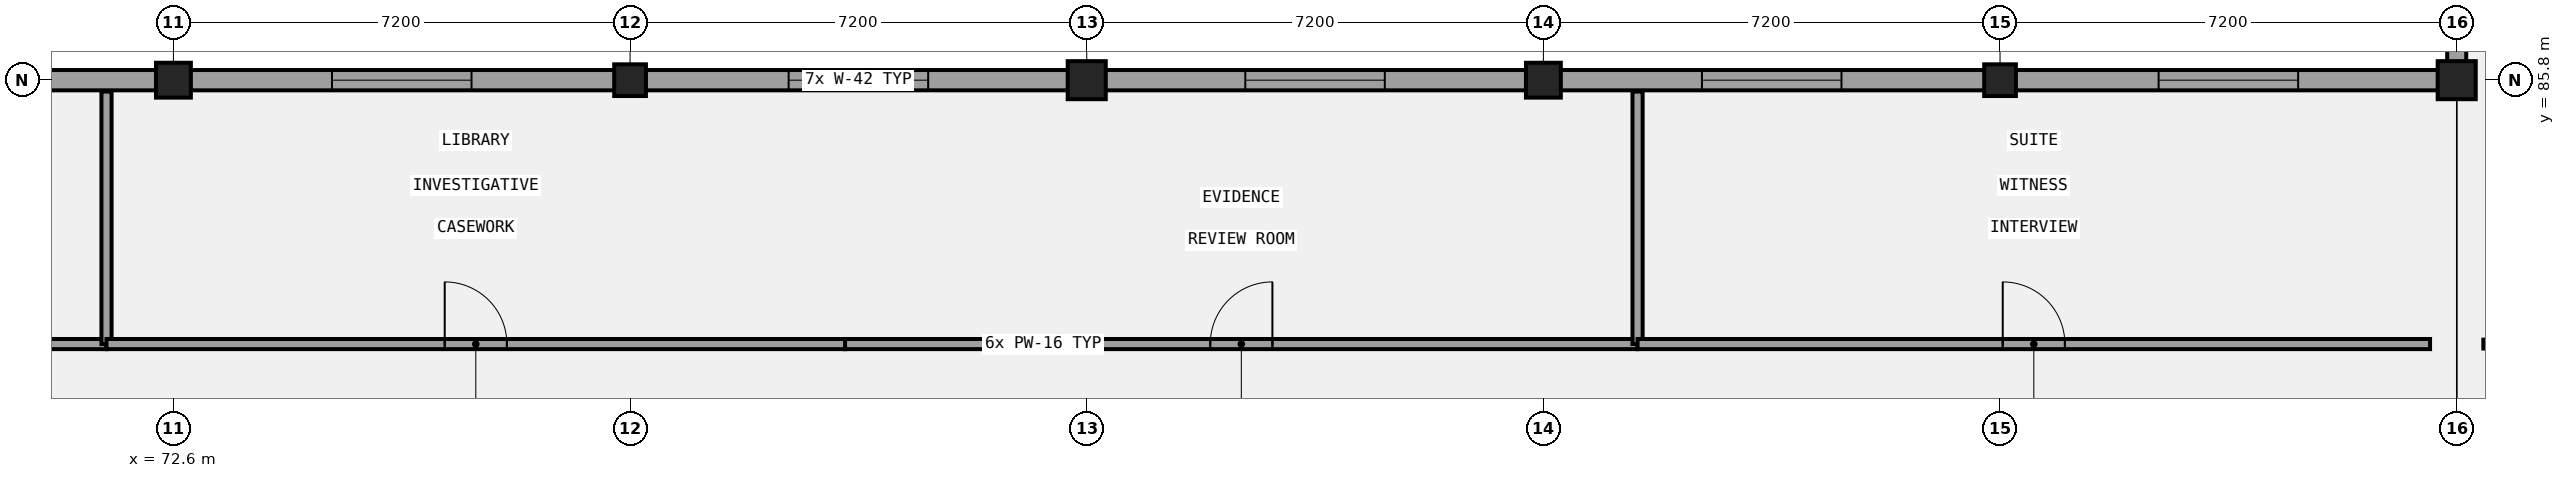
"""IFC4 building model, lengths in metres.
Left out: names, types, materials, properties, quantities, classifications, styles, units other than length and angle.
Written with IfcOpenShell. Run it as: python <this file> out.ifc"""

import sys

from ifc_helpers import new_model, si_unit, direction, frame, frame_2d, origin, origin_2d, place, context, subcontext, project, spatial, rectangle, extrude, element, fill, save


model = new_model("IFC4")
c1 = context("Model", 3, precision=1e-05, world=origin(), true_north=direction((0.0, 1.0)))
c2 = subcontext(c1, "Body", "Model", "MODEL_VIEW")
j1 = project(units=[si_unit("LENGTHUNIT", "METRE"), si_unit("PLANEANGLEUNIT", "RADIAN")], contexts=[c1])
p1 = place(None, origin())
s1 = spatial("IfcSite", under=j1, at=p1, CompositionType="ELEMENT")
p2 = place(p1, origin())
s2 = spatial("IfcBuilding", under=s1, at=p2, CompositionType="ELEMENT")
p3 = place(p2, frame((0.0, 0.0, 18.0)))
s3 = spatial("IfcBuildingStorey", under=s2, at=p3, CompositionType="ELEMENT", Elevation=18.0)
p4 = place(p3, frame((72.6, 85.8, 0.0), z_axis=(0.0, 0.0, 1.0), x_axis=(1.0, 0.0, 0.0)))
e1 = element("IfcColumn", 1, at=p4, inside=s3, PredefinedType="COLUMN", context=c2, shape_type="SweptSolid", body=[
    extrude(rectangle(XDim=0.55, YDim=0.55, at=origin_2d()), origin(), (0.0, 0.0, 1.0), 4.2),
])
p5 = place(p3, frame((79.8, 85.8, 0.0), z_axis=(0.0, 0.0, 1.0), x_axis=(1.0, 0.0, 0.0)))
e2 = element("IfcColumn", 2, at=p5, inside=s3, PredefinedType="COLUMN", context=c2, shape_type="SweptSolid", body=[
    extrude(rectangle(XDim=0.5, YDim=0.5, at=origin_2d()), origin(), (0.0, 0.0, 1.0), 4.2),
])
p6 = place(p3, frame((87.0, 85.8, 0.0), z_axis=(0.0, 0.0, 1.0), x_axis=(1.0, 0.0, 0.0)))
e3 = element("IfcColumn", 3, at=p6, inside=s3, PredefinedType="COLUMN", context=c2, shape_type="SweptSolid", body=[
    extrude(rectangle(XDim=0.6, YDim=0.6, at=origin_2d()), origin(), (0.0, 0.0, 1.0), 4.2),
])
p7 = place(p3, frame((94.2, 85.8, 0.0), z_axis=(0.0, 0.0, 1.0), x_axis=(1.0, 0.0, 0.0)))
e4 = element("IfcColumn", 4, at=p7, inside=s3, PredefinedType="COLUMN", context=c2, shape_type="SweptSolid", body=[
    extrude(rectangle(XDim=0.55, YDim=0.55, at=origin_2d()), origin(), (0.0, 0.0, 1.0), 4.2),
])
p8 = place(p3, frame((101.4, 85.8, 0.0), z_axis=(0.0, 0.0, 1.0), x_axis=(1.0, 0.0, 0.0)))
e5 = element("IfcColumn", 5, at=p8, inside=s3, PredefinedType="COLUMN", context=c2, shape_type="SweptSolid", body=[
    extrude(rectangle(XDim=0.5, YDim=0.5, at=origin_2d()), origin(), (0.0, 0.0, 1.0), 4.2),
])
p9 = place(p3, frame((108.6, 85.8, 0.0), z_axis=(0.0, 0.0, 1.0), x_axis=(1.0, 0.0, 0.0)))
e6 = element("IfcColumn", 6, at=p9, inside=s3, PredefinedType="COLUMN", context=c2, shape_type="SweptSolid", body=[
    extrude(rectangle(XDim=0.6, YDim=0.6, at=origin_2d()), origin(), (0.0, 0.0, 1.0), 4.2),
])
p10 = place(p3, frame((108.6, 92.81, 0.0), z_axis=(0.0, 0.0, 1.0), x_axis=(0.0, -1.0, 0.0)))
e7 = element("IfcWall", 7, at=p10, inside=s3, PredefinedType="SOLIDWALL", context=c2, shape_type="SweptSolid", body=[
    extrude(rectangle(XDim=6.86, YDim=0.3, at=frame_2d((3.43, 0.0))), origin(), (0.0, 0.0, 1.0), 3.39),
])
p11 = place(p10, frame((2.63, 0.0, 0.95)))
e8 = element("IfcOpeningElement", 8, at=p11, cuts=e7, PredefinedType="OPENING", context=c2, shape_type="SweptSolid", body=[
    extrude(rectangle(XDim=1.6, YDim=1.4, at=frame_2d((0.8, 0.7))), frame((0.0, 0.16, 0.0), z_axis=(0.0, -1.0, 0.0), x_axis=(1.0, 0.0, 0.0)), (0.0, 0.0, 1.0), 0.32),
])
p12 = place(p3, frame((108.76, 85.8, 0.0), z_axis=(0.0, 0.0, 1.0), x_axis=(-1.0, 0.0, 0.0)))
e9 = element("IfcWall", 9, at=p12, inside=s3, PredefinedType="SOLIDWALL", context=c2, shape_type="SweptSolid", body=[
    extrude(rectangle(XDim=101.12, YDim=0.32, at=frame_2d((50.56, 0.0))), origin(), (0.0, 0.0, 1.0), 2.94),
])
p13 = place(p12, frame((96.26, 0.0, 1.0)))
e10 = element("IfcOpeningElement", 10, at=p13, cuts=e9, PredefinedType="OPENING", context=c2, shape_type="SweptSolid", body=[
    extrude(rectangle(XDim=2.2, YDim=1.65, at=frame_2d((1.1, 0.825))), frame((0.0, 0.17, 0.0), z_axis=(0.0, -1.0, 0.0), x_axis=(1.0, 0.0, 0.0)), (0.0, 0.0, 1.0), 0.34),
])
p14 = place(p12, frame((89.06, 0.0, 1.0)))
e11 = element("IfcOpeningElement", 11, at=p14, cuts=e9, PredefinedType="OPENING", context=c2, shape_type="SweptSolid", body=[
    extrude(rectangle(XDim=2.2, YDim=1.65, at=frame_2d((1.1, 0.825))), frame((0.0, 0.17, 0.0), z_axis=(0.0, -1.0, 0.0), x_axis=(1.0, 0.0, 0.0)), (0.0, 0.0, 1.0), 0.34),
])
p15 = place(p12, frame((81.86, 0.0, 1.0)))
e12 = element("IfcOpeningElement", 12, at=p15, cuts=e9, PredefinedType="OPENING", context=c2, shape_type="SweptSolid", body=[
    extrude(rectangle(XDim=2.2, YDim=1.65, at=frame_2d((1.1, 0.825))), frame((0.0, 0.17, 0.0), z_axis=(0.0, -1.0, 0.0), x_axis=(1.0, 0.0, 0.0)), (0.0, 0.0, 1.0), 0.34),
])
p16 = place(p12, frame((74.66, 0.0, 1.0)))
e13 = element("IfcOpeningElement", 13, at=p16, cuts=e9, PredefinedType="OPENING", context=c2, shape_type="SweptSolid", body=[
    extrude(rectangle(XDim=2.2, YDim=1.65, at=frame_2d((1.1, 0.825))), frame((0.0, 0.17, 0.0), z_axis=(0.0, -1.0, 0.0), x_axis=(1.0, 0.0, 0.0)), (0.0, 0.0, 1.0), 0.34),
])
p17 = place(p12, frame((67.46, 0.0, 1.0)))
e14 = element("IfcOpeningElement", 14, at=p17, cuts=e9, PredefinedType="OPENING", context=c2, shape_type="SweptSolid", body=[
    extrude(rectangle(XDim=2.2, YDim=1.65, at=frame_2d((1.1, 0.825))), frame((0.0, 0.17, 0.0), z_axis=(0.0, -1.0, 0.0), x_axis=(1.0, 0.0, 0.0)), (0.0, 0.0, 1.0), 0.34),
])
p18 = place(p12, frame((60.26, 0.0, 1.0)))
e15 = element("IfcOpeningElement", 15, at=p18, cuts=e9, PredefinedType="OPENING", context=c2, shape_type="SweptSolid", body=[
    extrude(rectangle(XDim=2.2, YDim=1.65, at=frame_2d((1.1, 0.825))), frame((0.0, 0.17, 0.0), z_axis=(0.0, -1.0, 0.0), x_axis=(1.0, 0.0, 0.0)), (0.0, 0.0, 1.0), 0.34),
])
p19 = place(p12, frame((53.06, 0.0, 1.0)))
e16 = element("IfcOpeningElement", 16, at=p19, cuts=e9, PredefinedType="OPENING", context=c2, shape_type="SweptSolid", body=[
    extrude(rectangle(XDim=2.2, YDim=1.65, at=frame_2d((1.1, 0.825))), frame((0.0, 0.17, 0.0), z_axis=(0.0, -1.0, 0.0), x_axis=(1.0, 0.0, 0.0)), (0.0, 0.0, 1.0), 0.34),
])
p20 = place(p12, frame((45.86, 0.0, 1.0)))
e17 = element("IfcOpeningElement", 17, at=p20, cuts=e9, PredefinedType="OPENING", context=c2, shape_type="SweptSolid", body=[
    extrude(rectangle(XDim=2.2, YDim=1.65, at=frame_2d((1.1, 0.825))), frame((0.0, 0.17, 0.0), z_axis=(0.0, -1.0, 0.0), x_axis=(1.0, 0.0, 0.0)), (0.0, 0.0, 1.0), 0.34),
])
p21 = place(p12, frame((38.66, 0.0, 1.0)))
e18 = element("IfcOpeningElement", 18, at=p21, cuts=e9, PredefinedType="OPENING", context=c2, shape_type="SweptSolid", body=[
    extrude(rectangle(XDim=2.2, YDim=1.65, at=frame_2d((1.1, 0.825))), frame((0.0, 0.17, 0.0), z_axis=(0.0, -1.0, 0.0), x_axis=(1.0, 0.0, 0.0)), (0.0, 0.0, 1.0), 0.34),
])
p22 = place(p12, frame((31.46, 0.0, 1.0)))
e19 = element("IfcOpeningElement", 19, at=p22, cuts=e9, PredefinedType="OPENING", context=c2, shape_type="SweptSolid", body=[
    extrude(rectangle(XDim=2.2, YDim=1.65, at=frame_2d((1.1, 0.825))), frame((0.0, 0.17, 0.0), z_axis=(0.0, -1.0, 0.0), x_axis=(1.0, 0.0, 0.0)), (0.0, 0.0, 1.0), 0.34),
])
p23 = place(p12, frame((24.26, 0.0, 1.0)))
e20 = element("IfcOpeningElement", 20, at=p23, cuts=e9, PredefinedType="OPENING", context=c2, shape_type="SweptSolid", body=[
    extrude(rectangle(XDim=2.2, YDim=1.65, at=frame_2d((1.1, 0.825))), frame((0.0, 0.17, 0.0), z_axis=(0.0, -1.0, 0.0), x_axis=(1.0, 0.0, 0.0)), (0.0, 0.0, 1.0), 0.34),
])
p24 = place(p12, frame((17.06, 0.0, 1.0)))
e21 = element("IfcOpeningElement", 21, at=p24, cuts=e9, PredefinedType="OPENING", context=c2, shape_type="SweptSolid", body=[
    extrude(rectangle(XDim=2.2, YDim=1.65, at=frame_2d((1.1, 0.825))), frame((0.0, 0.17, 0.0), z_axis=(0.0, -1.0, 0.0), x_axis=(1.0, 0.0, 0.0)), (0.0, 0.0, 1.0), 0.34),
])
p25 = place(p12, frame((9.86, 0.0, 1.0)))
e22 = element("IfcOpeningElement", 22, at=p25, cuts=e9, PredefinedType="OPENING", context=c2, shape_type="SweptSolid", body=[
    extrude(rectangle(XDim=2.2, YDim=1.65, at=frame_2d((1.1, 0.825))), frame((0.0, 0.17, 0.0), z_axis=(0.0, -1.0, 0.0), x_axis=(1.0, 0.0, 0.0)), (0.0, 0.0, 1.0), 0.34),
])
p26 = place(p12, frame((2.66, 0.0, 1.0)))
e23 = element("IfcOpeningElement", 23, at=p26, cuts=e9, PredefinedType="OPENING", context=c2, shape_type="SweptSolid", body=[
    extrude(rectangle(XDim=2.2, YDim=1.65, at=frame_2d((1.1, 0.825))), frame((0.0, 0.17, 0.0), z_axis=(0.0, -1.0, 0.0), x_axis=(1.0, 0.0, 0.0)), (0.0, 0.0, 1.0), 0.34),
])
p27 = place(p3, frame((109.02, 81.64, 0.0), z_axis=(0.0, 0.0, 1.0), x_axis=(1.0, 0.0, 0.0)))
e24 = element("IfcWall", 24, at=p27, inside=s3, PredefinedType="PARTITIONING", context=c2, shape_type="SweptSolid", body=[
    extrude(rectangle(XDim=8.79, YDim=0.14, at=frame_2d((4.395, 0.0))), origin(), (0.0, 0.0, 1.0), 3.94),
])
p28 = place(p27, frame((3.875, 0.0, 0.0)))
e25 = element("IfcOpeningElement", 25, at=p28, cuts=e24, PredefinedType="OPENING", context=c2, shape_type="SweptSolid", body=[
    extrude(rectangle(XDim=1.04, YDim=2.22, at=frame_2d((0.52, 1.11))), frame((0.0, 0.08, 0.0), z_axis=(0.0, -1.0, 0.0), x_axis=(1.0, 0.0, 0.0)), (0.0, 0.0, 1.0), 0.16),
])
p29 = place(p3, frame((58.2, 81.64, 0.0), z_axis=(0.0, 0.0, 1.0), x_axis=(1.0, 0.0, 0.0)))
e26 = element("IfcWall", 26, at=p29, inside=s3, PredefinedType="PARTITIONING", context=c2, shape_type="SweptSolid", body=[
    extrude(rectangle(XDim=13.345, YDim=0.16, at=frame_2d((6.672, 0.0))), origin(), (0.0, 0.0, 1.0), 3.94),
])
p30 = place(p29, frame((6.212, 0.0, 0.0)))
e27 = element("IfcOpeningElement", 27, at=p30, cuts=e26, PredefinedType="OPENING", context=c2, shape_type="SweptSolid", body=[
    extrude(rectangle(XDim=0.92, YDim=2.35, at=frame_2d((0.46, 1.175))), frame((0.0, 0.09, 0.0), z_axis=(0.0, -1.0, 0.0), x_axis=(1.0, 0.0, 0.0)), (0.0, 0.0, 1.0), 0.18),
])
p31 = place(p3, frame((71.545, 81.64, 0.0), z_axis=(0.0, 0.0, 1.0), x_axis=(0.0, 1.0, 0.0)))
e28 = element("IfcWall", 28, at=p31, inside=s3, PredefinedType="PARTITIONING", context=c2, shape_type="SweptSolid", body=[
    extrude(rectangle(XDim=3.98, YDim=0.16, at=frame_2d((1.99, 0.0))), origin(), (0.0, 0.0, 1.0), 3.94),
])
p32 = place(p3, frame((71.545, 81.64, 0.0), z_axis=(0.0, 0.0, 1.0), x_axis=(1.0, 0.0, 0.0)))
e29 = element("IfcWall", 29, at=p32, inside=s3, PredefinedType="PARTITIONING", context=c2, shape_type="SweptSolid", body=[
    extrude(rectangle(XDim=11.645, YDim=0.16, at=frame_2d((5.823, 0.0))), origin(), (0.0, 0.0, 1.0), 3.94),
])
p33 = place(p32, frame((5.333, 0.0, 0.0)))
e30 = element("IfcOpeningElement", 30, at=p33, cuts=e29, PredefinedType="OPENING", context=c2, shape_type="SweptSolid", body=[
    extrude(rectangle(XDim=0.98, YDim=2.1, at=frame_2d((0.49, 1.05))), frame((0.0, 0.09, 0.0), z_axis=(0.0, -1.0, 0.0), x_axis=(1.0, 0.0, 0.0)), (0.0, 0.0, 1.0), 0.18),
])
p34 = place(p3, frame((83.19, 81.64, 0.0), z_axis=(0.0, 0.0, 1.0), x_axis=(1.0, 0.0, 0.0)))
e31 = element("IfcWall", 31, at=p34, inside=s3, PredefinedType="PARTITIONING", context=c2, shape_type="SweptSolid", body=[
    extrude(rectangle(XDim=12.495, YDim=0.16, at=frame_2d((6.248, 0.0))), origin(), (0.0, 0.0, 1.0), 3.94),
])
p35 = place(p34, frame((5.758, 0.0, 0.0)))
e32 = element("IfcOpeningElement", 32, at=p35, cuts=e31, PredefinedType="OPENING", context=c2, shape_type="SweptSolid", body=[
    extrude(rectangle(XDim=0.98, YDim=2.22, at=frame_2d((0.49, 1.11))), frame((0.0, 0.09, 0.0), z_axis=(0.0, -1.0, 0.0), x_axis=(1.0, 0.0, 0.0)), (0.0, 0.0, 1.0), 0.18),
])
p36 = place(p3, frame((95.685, 81.64, 0.0), z_axis=(0.0, 0.0, 1.0), x_axis=(0.0, 1.0, 0.0)))
e33 = element("IfcWall", 33, at=p36, inside=s3, PredefinedType="PARTITIONING", context=c2, shape_type="SweptSolid", body=[
    extrude(rectangle(XDim=3.98, YDim=0.16, at=frame_2d((1.99, 0.0))), origin(), (0.0, 0.0, 1.0), 3.94),
])
p37 = place(p3, frame((95.685, 81.64, 0.0), z_axis=(0.0, 0.0, 1.0), x_axis=(1.0, 0.0, 0.0)))
e34 = element("IfcWall", 34, at=p37, inside=s3, PredefinedType="PARTITIONING", context=c2, shape_type="SweptSolid", body=[
    extrude(rectangle(XDim=12.495, YDim=0.16, at=frame_2d((6.248, 0.0))), origin(), (0.0, 0.0, 1.0), 3.94),
])
p38 = place(p37, frame((5.758, 0.0, 0.0)))
e35 = element("IfcOpeningElement", 35, at=p38, cuts=e34, PredefinedType="OPENING", context=c2, shape_type="SweptSolid", body=[
    extrude(rectangle(XDim=0.98, YDim=2.35, at=frame_2d((0.49, 1.175))), frame((0.0, 0.09, 0.0), z_axis=(0.0, -1.0, 0.0), x_axis=(1.0, 0.0, 0.0)), (0.0, 0.0, 1.0), 0.18),
])
p39 = place(p22, origin())
e36 = element("IfcWindow", 36, at=p39, inside=s3, PartitioningType="SINGLE_PANEL", PredefinedType="WINDOW", context=c2, shape_type="SweptSolid", body=[
    extrude(rectangle(XDim=2.2, YDim=1.65, at=frame_2d((1.1, 0.825))), frame((0.0, 0.03, 0.0), z_axis=(0.0, -1.0, 0.0), x_axis=(1.0, 0.0, 0.0)), (0.0, 0.0, 1.0), 0.06),
])
fill(e19, e36)
p40 = place(p23, origin())
e37 = element("IfcWindow", 37, at=p40, inside=s3, PartitioningType="SINGLE_PANEL", PredefinedType="WINDOW", context=c2, shape_type="SweptSolid", body=[
    extrude(rectangle(XDim=2.2, YDim=1.65, at=frame_2d((1.1, 0.825))), frame((0.0, 0.03, 0.0), z_axis=(0.0, -1.0, 0.0), x_axis=(1.0, 0.0, 0.0)), (0.0, 0.0, 1.0), 0.06),
])
fill(e20, e37)
p41 = place(p24, origin())
e38 = element("IfcWindow", 38, at=p41, inside=s3, PartitioningType="SINGLE_PANEL", PredefinedType="WINDOW", context=c2, shape_type="SweptSolid", body=[
    extrude(rectangle(XDim=2.2, YDim=1.65, at=frame_2d((1.1, 0.825))), frame((0.0, 0.03, 0.0), z_axis=(0.0, -1.0, 0.0), x_axis=(1.0, 0.0, 0.0)), (0.0, 0.0, 1.0), 0.06),
])
fill(e21, e38)
p42 = place(p25, origin())
e39 = element("IfcWindow", 39, at=p42, inside=s3, PartitioningType="SINGLE_PANEL", PredefinedType="WINDOW", context=c2, shape_type="SweptSolid", body=[
    extrude(rectangle(XDim=2.2, YDim=1.65, at=frame_2d((1.1, 0.825))), frame((0.0, 0.03, 0.0), z_axis=(0.0, -1.0, 0.0), x_axis=(1.0, 0.0, 0.0)), (0.0, 0.0, 1.0), 0.06),
])
fill(e22, e39)
p43 = place(p26, origin())
e40 = element("IfcWindow", 40, at=p43, inside=s3, PartitioningType="SINGLE_PANEL", PredefinedType="WINDOW", context=c2, shape_type="SweptSolid", body=[
    extrude(rectangle(XDim=2.2, YDim=1.65, at=frame_2d((1.1, 0.825))), frame((0.0, 0.03, 0.0), z_axis=(0.0, -1.0, 0.0), x_axis=(1.0, 0.0, 0.0)), (0.0, 0.0, 1.0), 0.06),
])
fill(e23, e40)
p44 = place(p33, origin())
e41 = element("IfcDoor", 41, at=p44, inside=s3, OperationType="SINGLE_SWING_LEFT", PredefinedType="DOOR", context=c2, shape_type="SweptSolid", body=[
    extrude(rectangle(XDim=0.98, YDim=2.1, at=frame_2d((0.49, 1.05))), frame((0.0, 0.025, 0.0), z_axis=(0.0, -1.0, 0.0), x_axis=(1.0, 0.0, 0.0)), (0.0, 0.0, 1.0), 0.05),
])
fill(e30, e41)
p45 = place(p35, origin())
e42 = element("IfcDoor", 42, at=p45, inside=s3, OperationType="SINGLE_SWING_RIGHT", PredefinedType="DOOR", context=c2, shape_type="SweptSolid", body=[
    extrude(rectangle(XDim=0.98, YDim=2.22, at=frame_2d((0.49, 1.11))), frame((0.0, 0.025, 0.0), z_axis=(0.0, -1.0, 0.0), x_axis=(1.0, 0.0, 0.0)), (0.0, 0.0, 1.0), 0.05),
])
fill(e32, e42)
p46 = place(p38, origin())
e43 = element("IfcDoor", 43, at=p46, inside=s3, OperationType="SINGLE_SWING_LEFT", PredefinedType="DOOR", context=c2, shape_type="SweptSolid", body=[
    extrude(rectangle(XDim=0.98, YDim=2.35, at=frame_2d((0.49, 1.175))), frame((0.0, 0.025, 0.0), z_axis=(0.0, -1.0, 0.0), x_axis=(1.0, 0.0, 0.0)), (0.0, 0.0, 1.0), 0.05),
])
fill(e35, e43)
save(model, sys.argv[1])
